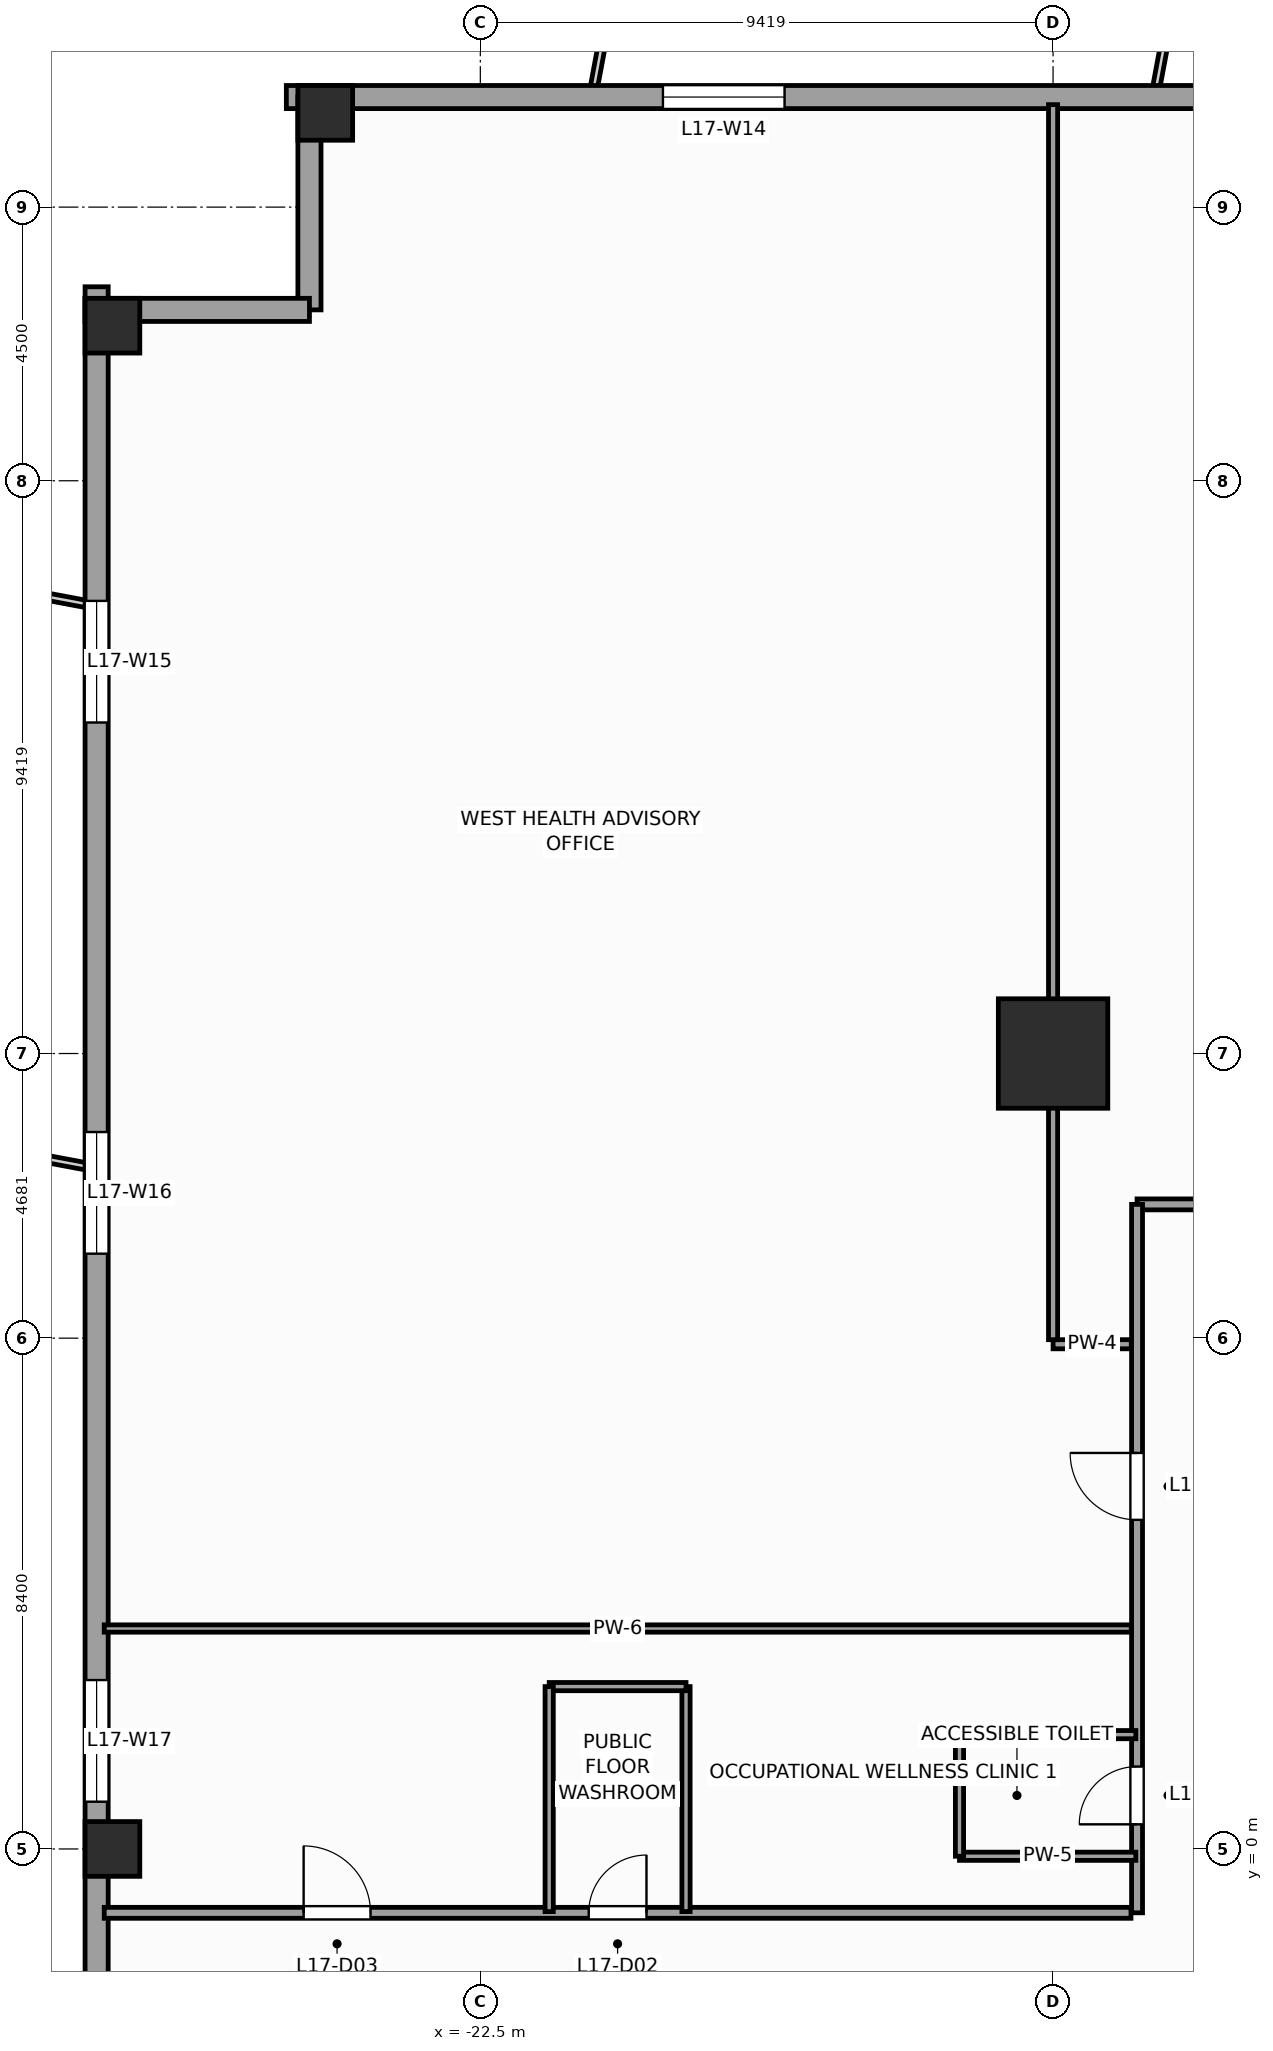
"""IFC4 building model, lengths in metres.
Left out: names, types, materials, properties, quantities, classifications, styles, units other than length and angle.
Written with IfcOpenShell. Run it as: python <this file> out.ifc"""

import sys

from ifc_helpers import new_model, si_unit, direction, frame, frame_2d, origin, origin_2d, place, context, subcontext, project, spatial, rectangle, extrude, source, transform, mapped, element, fill, save


model = new_model("IFC4")
c1 = context("Model", 3, precision=1e-05, world=origin(), true_north=direction((0.0, 1.0)))
c2 = subcontext(c1, "Body", "Model", "MODEL_VIEW")
j1 = project(units=[si_unit("LENGTHUNIT", "METRE"), si_unit("PLANEANGLEUNIT", "RADIAN")], contexts=[c1])
p1 = place(None, origin())
s1 = spatial("IfcSite", under=j1, at=p1, CompositionType="ELEMENT")
p2 = place(p1, origin())
s2 = spatial("IfcBuilding", under=s1, at=p2, CompositionType="ELEMENT")
p3 = place(p2, frame((0.0, 0.0, 74.0)))
s3 = spatial("IfcBuildingStorey", under=s2, at=p3, CompositionType="ELEMENT", Elevation=74.0)
m1 = source(origin(), c2, "Body", "SweptSolid", [
    extrude(rectangle(XDim=1.8, YDim=1.8, at=origin_2d()), origin(), (0.0, 0.0, 1.0), 4.0),
])
p4 = place(p3, frame((-13.081, 13.081, 0.0), z_axis=(0.0, 0.0, 1.0), x_axis=(1.0, 0.0, 0.0)))
e1 = element("IfcColumn", 1, at=p4, inside=s3, PredefinedType="COLUMN", context=c2, shape_type="MappedRepresentation", body=[
    mapped(m1, transform((0.0, 0.0, 0.0), scale=1.0)),
])
m2 = source(origin(), c2, "Body", "SweptSolid", [
    extrude(rectangle(XDim=0.9, YDim=0.9, at=origin_2d()), origin(), (0.0, 0.0, 1.0), 4.0),
])
for number, where, z_axis, x_axis in (
    (2, (-25.05, 28.55, 0.0), (0.0, 0.0, 1.0), (1.0, 0.0, 0.0)),
    (3, (-28.55, 25.05, 0.0), (0.0, 0.0, 1.0), (1.0, 0.0, 0.0)),
    (4, (-28.55, 0.0, 0.0), (0.0, 0.0, 1.0), (1.0, 0.0, 0.0)),
):
    element("IfcColumn", number, at=place(p3, frame(where, z_axis=z_axis, x_axis=x_axis)), inside=s3, PredefinedType="COLUMN", context=c2, shape_type="MappedRepresentation", body=[
        mapped(m2, transform((0.0, 0.0, 0.0), scale=1.0)),
    ])
p5 = place(p3, frame((25.69, 28.81, 0.0), z_axis=(0.0, 0.0, 1.0), x_axis=(-1.0, 0.0, 0.0)))
e5 = element("IfcWall", 5, at=p5, inside=s3, PredefinedType="STANDARD", context=c2, shape_type="SweptSolid", body=[
    extrude(rectangle(XDim=51.38, YDim=0.38, at=frame_2d((25.69, 0.0))), origin(), (0.0, 0.0, 1.0), 2.2),
])
p6 = place(p5, frame((30.765, 0.0, 0.0)))
e6 = element("IfcOpeningElement", 6, at=p6, cuts=e5, PredefinedType="OPENING", context=c2, shape_type="SweptSolid", body=[
    extrude(rectangle(XDim=1.05, YDim=2.02, at=frame_2d((0.525, 1.01))), frame((0.0, 0.2, 0.0), z_axis=(0.0, -1.0, 0.0), x_axis=(1.0, 0.0, 0.0)), (0.0, 0.0, 1.0), 0.4),
])
p7 = place(p5, frame((5.166, 0.0, 0.67)))
e7 = element("IfcOpeningElement", 7, at=p7, cuts=e5, PredefinedType="OPENING", context=c2, shape_type="SweptSolid", body=[
    extrude(rectangle(XDim=2.0, YDim=1.45, at=frame_2d((1.0, 0.725))), frame((0.0, 0.2, 0.0), z_axis=(0.0, -1.0, 0.0), x_axis=(1.0, 0.0, 0.0)), (0.0, 0.0, 1.0), 0.4),
])
p8 = place(p5, frame((13.9, 0.0, 0.67)))
e8 = element("IfcOpeningElement", 8, at=p8, cuts=e5, PredefinedType="OPENING", context=c2, shape_type="SweptSolid", body=[
    extrude(rectangle(XDim=2.0, YDim=1.45, at=frame_2d((1.0, 0.725))), frame((0.0, 0.2, 0.0), z_axis=(0.0, -1.0, 0.0), x_axis=(1.0, 0.0, 0.0)), (0.0, 0.0, 1.0), 0.4),
])
p9 = place(p5, frame((22.912, 0.0, 0.67)))
e9 = element("IfcOpeningElement", 9, at=p9, cuts=e5, PredefinedType="OPENING", context=c2, shape_type="SweptSolid", body=[
    extrude(rectangle(XDim=2.0, YDim=1.45, at=frame_2d((1.0, 0.725))), frame((0.0, 0.2, 0.0), z_axis=(0.0, -1.0, 0.0), x_axis=(1.0, 0.0, 0.0)), (0.0, 0.0, 1.0), 0.4),
])
p10 = place(p5, frame((33.938, 0.0, 0.67)))
e10 = element("IfcOpeningElement", 10, at=p10, cuts=e5, PredefinedType="OPENING", context=c2, shape_type="SweptSolid", body=[
    extrude(rectangle(XDim=2.0, YDim=1.45, at=frame_2d((1.0, 0.725))), frame((0.0, 0.2, 0.0), z_axis=(0.0, -1.0, 0.0), x_axis=(1.0, 0.0, 0.0)), (0.0, 0.0, 1.0), 0.4),
])
p11 = place(p5, frame((43.187, 0.0, 0.67)))
e11 = element("IfcOpeningElement", 11, at=p11, cuts=e5, PredefinedType="OPENING", context=c2, shape_type="SweptSolid", body=[
    extrude(rectangle(XDim=2.0, YDim=1.45, at=frame_2d((1.0, 0.725))), frame((0.0, 0.2, 0.0), z_axis=(0.0, -1.0, 0.0), x_axis=(1.0, 0.0, 0.0)), (0.0, 0.0, 1.0), 0.4),
])
p12 = place(p3, frame((-25.31, 28.81, 0.0), z_axis=(0.0, 0.0, 1.0), x_axis=(0.0, -1.0, 0.0)))
e12 = element("IfcWall", 12, at=p12, inside=s3, PredefinedType="STANDARD", context=c2, shape_type="SweptSolid", body=[
    extrude(rectangle(XDim=3.5, YDim=0.38, at=frame_2d((1.75, 0.0))), origin(), (0.0, 0.0, 1.0), 3.6),
])
p13 = place(p3, frame((-25.31, 25.31, 0.0), z_axis=(0.0, 0.0, 1.0), x_axis=(-1.0, 0.0, 0.0)))
e13 = element("IfcWall", 13, at=p13, inside=s3, PredefinedType="STANDARD", context=c2, shape_type="SweptSolid", body=[
    extrude(rectangle(XDim=3.69, YDim=0.38, at=frame_2d((1.845, 0.0))), origin(), (0.0, 0.0, 1.0), 3.6),
])
p14 = place(p3, frame((-28.81, 25.69, 0.0), z_axis=(0.0, 0.0, 1.0), x_axis=(0.0, -1.0, 0.0)))
e14 = element("IfcWall", 14, at=p14, inside=s3, PredefinedType="STANDARD", context=c2, shape_type="SweptSolid", body=[
    extrude(rectangle(XDim=51.38, YDim=0.38, at=frame_2d((25.69, 0.0))), origin(), (0.0, 0.0, 1.0), 2.2),
])
p15 = place(p14, frame((5.166, 0.0, 0.67)))
e15 = element("IfcOpeningElement", 15, at=p15, cuts=e14, PredefinedType="OPENING", context=c2, shape_type="SweptSolid", body=[
    extrude(rectangle(XDim=2.0, YDim=1.45, at=frame_2d((1.0, 0.725))), frame((0.0, 0.2, 0.0), z_axis=(0.0, -1.0, 0.0), x_axis=(1.0, 0.0, 0.0)), (0.0, 0.0, 1.0), 0.4),
])
p16 = place(p14, frame((13.9, 0.0, 0.67)))
e16 = element("IfcOpeningElement", 16, at=p16, cuts=e14, PredefinedType="OPENING", context=c2, shape_type="SweptSolid", body=[
    extrude(rectangle(XDim=2.0, YDim=1.45, at=frame_2d((1.0, 0.725))), frame((0.0, 0.2, 0.0), z_axis=(0.0, -1.0, 0.0), x_axis=(1.0, 0.0, 0.0)), (0.0, 0.0, 1.0), 0.4),
])
p17 = place(p14, frame((22.912, 0.0, 0.67)))
e17 = element("IfcOpeningElement", 17, at=p17, cuts=e14, PredefinedType="OPENING", context=c2, shape_type="SweptSolid", body=[
    extrude(rectangle(XDim=2.0, YDim=1.45, at=frame_2d((1.0, 0.725))), frame((0.0, 0.2, 0.0), z_axis=(0.0, -1.0, 0.0), x_axis=(1.0, 0.0, 0.0)), (0.0, 0.0, 1.0), 0.4),
])
p18 = place(p14, frame((33.938, 0.0, 0.67)))
e18 = element("IfcOpeningElement", 18, at=p18, cuts=e14, PredefinedType="OPENING", context=c2, shape_type="SweptSolid", body=[
    extrude(rectangle(XDim=2.0, YDim=1.45, at=frame_2d((1.0, 0.725))), frame((0.0, 0.2, 0.0), z_axis=(0.0, -1.0, 0.0), x_axis=(1.0, 0.0, 0.0)), (0.0, 0.0, 1.0), 0.4),
])
p19 = place(p14, frame((43.187, 0.0, 0.67)))
e19 = element("IfcOpeningElement", 19, at=p19, cuts=e14, PredefinedType="OPENING", context=c2, shape_type="SweptSolid", body=[
    extrude(rectangle(XDim=2.0, YDim=1.45, at=frame_2d((1.0, 0.725))), frame((0.0, 0.2, 0.0), z_axis=(0.0, -1.0, 0.0), x_axis=(1.0, 0.0, 0.0)), (0.0, 0.0, 1.0), 0.4),
])
p20 = place(p3, frame((-11.7, 10.6, 0.0), z_axis=(0.0, 0.0, 1.0), x_axis=(1.0, 0.0, 0.0)))
e20 = element("IfcWall", 20, at=p20, inside=s3, PredefinedType="PARTITIONING", context=c2, shape_type="SweptSolid", body=[
    extrude(rectangle(XDim=24.45, YDim=0.18, at=frame_2d((12.225, 0.0))), origin(), (0.0, 0.0, 1.0), 3.6),
])
p21 = place(p20, frame((3.714, 0.0, 0.0)))
e21 = element("IfcOpeningElement", 21, at=p21, cuts=e20, PredefinedType="OPENING", context=c2, shape_type="SweptSolid", body=[
    extrude(rectangle(XDim=1.1, YDim=2.2, at=frame_2d((0.55, 1.1))), frame((0.0, 0.1, 0.0), z_axis=(0.0, -1.0, 0.0), x_axis=(1.0, 0.0, 0.0)), (0.0, 0.0, 1.0), 0.2),
])
p22 = place(p20, frame((11.65, 0.0, 0.0)))
e22 = element("IfcOpeningElement", 22, at=p22, cuts=e20, PredefinedType="OPENING", context=c2, shape_type="SweptSolid", body=[
    extrude(rectangle(XDim=1.1, YDim=2.2, at=frame_2d((0.55, 1.1))), frame((0.0, 0.1, 0.0), z_axis=(0.0, -1.0, 0.0), x_axis=(1.0, 0.0, 0.0)), (0.0, 0.0, 1.0), 0.2),
])
p23 = place(p20, frame((19.611, 0.0, 0.0)))
e23 = element("IfcOpeningElement", 23, at=p23, cuts=e20, PredefinedType="OPENING", context=c2, shape_type="SweptSolid", body=[
    extrude(rectangle(XDim=1.1, YDim=2.2, at=frame_2d((0.55, 1.1))), frame((0.0, 0.1, 0.0), z_axis=(0.0, -1.0, 0.0), x_axis=(1.0, 0.0, 0.0)), (0.0, 0.0, 1.0), 0.2),
])
p24 = place(p3, frame((-11.7, -1.05, 0.0), z_axis=(0.0, 0.0, 1.0), x_axis=(0.0, 1.0, 0.0)))
e24 = element("IfcWall", 24, at=p24, inside=s3, PredefinedType="PARTITIONING", context=c2, shape_type="SweptSolid", body=[
    extrude(rectangle(XDim=11.65, YDim=0.18, at=frame_2d((5.825, 0.0))), origin(), (0.0, 0.0, 1.0), 3.6),
])
p25 = place(p24, frame((1.455, 0.0, 0.0)))
e25 = element("IfcOpeningElement", 25, at=p25, cuts=e24, PredefinedType="OPENING", context=c2, shape_type="SweptSolid", body=[
    extrude(rectangle(XDim=0.95, YDim=2.1, at=frame_2d((0.475, 1.05))), frame((0.0, 0.1, 0.0), z_axis=(0.0, -1.0, 0.0), x_axis=(1.0, 0.0, 0.0)), (0.0, 0.0, 1.0), 0.2),
])
p26 = place(p24, frame((6.462, 0.0, 0.0)))
e26 = element("IfcOpeningElement", 26, at=p26, cuts=e24, PredefinedType="OPENING", context=c2, shape_type="SweptSolid", body=[
    extrude(rectangle(XDim=1.1, YDim=2.2, at=frame_2d((0.55, 1.1))), frame((0.0, 0.1, 0.0), z_axis=(0.0, -1.0, 0.0), x_axis=(1.0, 0.0, 0.0)), (0.0, 0.0, 1.0), 0.2),
])
p27 = place(p3, frame((-28.685, -1.05, 0.0), z_axis=(0.0, 0.0, 1.0), x_axis=(1.0, 0.0, 0.0)))
e27 = element("IfcWall", 27, at=p27, inside=s3, PredefinedType="PARTITIONING", context=c2, shape_type="SweptSolid", body=[
    extrude(rectangle(XDim=16.885, YDim=0.18, at=frame_2d((8.442, 0.0))), origin(), (0.0, 0.0, 1.0), 3.6),
])
p28 = place(p27, frame((7.968, 0.0, 0.0)))
e28 = element("IfcOpeningElement", 28, at=p28, cuts=e27, PredefinedType="OPENING", context=c2, shape_type="SweptSolid", body=[
    extrude(rectangle(XDim=0.95, YDim=2.1, at=frame_2d((0.475, 1.05))), frame((0.0, 0.1, 0.0), z_axis=(0.0, -1.0, 0.0), x_axis=(1.0, 0.0, 0.0)), (0.0, 0.0, 1.0), 0.2),
])
p29 = place(p27, frame((3.279, 0.0, 0.0)))
e29 = element("IfcOpeningElement", 29, at=p29, cuts=e27, PredefinedType="OPENING", context=c2, shape_type="SweptSolid", body=[
    extrude(rectangle(XDim=1.1, YDim=2.2, at=frame_2d((0.55, 1.1))), frame((0.0, 0.1, 0.0), z_axis=(0.0, -1.0, 0.0), x_axis=(1.0, 0.0, 0.0)), (0.0, 0.0, 1.0), 0.2),
])
p30 = place(p3, frame((-11.795, 8.3, 0.0), z_axis=(0.0, 0.0, 1.0), x_axis=(-1.0, 0.0, 0.0)))
e30 = element("IfcWall", 30, at=p30, inside=s3, PredefinedType="PARTITIONING", context=c2, shape_type="SweptSolid", body=[
    extrude(rectangle(XDim=1.286, YDim=0.15, at=frame_2d((0.643, 0.0))), origin(), (0.0, 0.0, 1.0), 3.6),
])
p31 = place(p3, frame((-13.081, 8.375, 0.0), z_axis=(0.0, 0.0, 1.0), x_axis=(0.0, 1.0, 0.0)))
e31 = element("IfcWall", 31, at=p31, inside=s3, PredefinedType="PARTITIONING", context=c2, shape_type="SweptSolid", body=[
    extrude(rectangle(XDim=20.31, YDim=0.15, at=frame_2d((10.155, 0.0))), origin(), (0.0, 0.0, 1.0), 2.2),
])
p32 = place(p3, frame((-28.685, 3.625, 0.0), z_axis=(0.0, 0.0, 1.0), x_axis=(1.0, 0.0, 0.0)))
e32 = element("IfcWall", 32, at=p32, inside=s3, PredefinedType="PARTITIONING", context=c2, shape_type="SweptSolid", body=[
    extrude(rectangle(XDim=16.89, YDim=0.12, at=frame_2d((8.445, 0.0))), origin(), (0.0, 0.0, 1.0), 3.6),
])
for number, where, z_axis, x_axis in (
    (33, (-14.62, -0.12, 0.0), (0.0, 0.0, 1.0), (1.0, 0.0, 0.0)),
    (34, (-14.62, 1.88, 0.0), (0.0, 0.0, 1.0), (1.0, 0.0, 0.0)),
):
    element("IfcWall", number, at=place(p3, frame(where, z_axis=z_axis, x_axis=x_axis)), inside=s3, PredefinedType="PARTITIONING", context=c2, shape_type="SweptSolid", body=[
        extrude(rectangle(XDim=2.9, YDim=0.135, at=frame_2d((1.45, 0.0))), origin(), (0.0, 0.0, 1.0), 3.6),
    ])
p33 = place(p3, frame((-14.62, -0.12, 0.0), z_axis=(0.0, 0.0, 1.0), x_axis=(0.0, 1.0, 0.0)))
e35 = element("IfcWall", 35, at=p33, inside=s3, PredefinedType="PARTITIONING", context=c2, shape_type="SweptSolid", body=[
    extrude(rectangle(XDim=2.0, YDim=0.135, at=frame_2d((1.0, 0.0))), origin(), (0.0, 0.0, 1.0), 3.6),
])
p34 = place(p3, frame((-19.117, -1.03, 0.0), z_axis=(0.0, 0.0, 1.0), x_axis=(0.0, 1.0, 0.0)))
e36 = element("IfcWall", 36, at=p34, inside=s3, PredefinedType="PARTITIONING", context=c2, shape_type="SweptSolid", body=[
    extrude(rectangle(XDim=3.7, YDim=0.135, at=frame_2d((1.85, 0.0))), origin(), (0.0, 0.0, 1.0), 3.6),
])
p35 = place(p3, frame((-21.367, 2.67, 0.0), z_axis=(0.0, 0.0, 1.0), x_axis=(1.0, 0.0, 0.0)))
e37 = element("IfcWall", 37, at=p35, inside=s3, PredefinedType="PARTITIONING", context=c2, shape_type="SweptSolid", body=[
    extrude(rectangle(XDim=2.25, YDim=0.135, at=frame_2d((1.125, 0.0))), origin(), (0.0, 0.0, 1.0), 3.6),
])
p36 = place(p3, frame((-21.367, -1.03, 0.0), z_axis=(0.0, 0.0, 1.0), x_axis=(0.0, 1.0, 0.0)))
e38 = element("IfcWall", 38, at=p36, inside=s3, PredefinedType="PARTITIONING", context=c2, shape_type="SweptSolid", body=[
    extrude(rectangle(XDim=3.7, YDim=0.135, at=frame_2d((1.85, 0.0))), origin(), (0.0, 0.0, 1.0), 3.6),
])
m3 = source(origin(), c2, "Body", "SweptSolid", [
    extrude(rectangle(XDim=2.0, YDim=1.45, at=frame_2d((1.0, 0.725))), frame((0.0, 0.03, 0.0), z_axis=(0.0, -1.0, 0.0), x_axis=(1.0, 0.0, 0.0)), (0.0, 0.0, 1.0), 0.06),
])
p37 = place(p11, origin())
e39 = element("IfcWindow", 39, at=p37, inside=s3, PartitioningType="SINGLE_PANEL", PredefinedType="WINDOW", context=c2, shape_type="MappedRepresentation", body=[
    mapped(m3, transform((0.0, 0.0, 0.0), scale=1.0)),
])
fill(e11, e39)
p38 = place(p15, origin())
e40 = element("IfcWindow", 40, at=p38, inside=s3, PartitioningType="SINGLE_PANEL", PredefinedType="WINDOW", context=c2, shape_type="MappedRepresentation", body=[
    mapped(m3, transform((0.0, 0.0, 0.0), scale=1.0)),
])
fill(e15, e40)
p39 = place(p16, origin())
e41 = element("IfcWindow", 41, at=p39, inside=s3, PartitioningType="SINGLE_PANEL", PredefinedType="WINDOW", context=c2, shape_type="MappedRepresentation", body=[
    mapped(m3, transform((0.0, 0.0, 0.0), scale=1.0)),
])
fill(e16, e41)
p40 = place(p17, origin())
e42 = element("IfcWindow", 42, at=p40, inside=s3, PartitioningType="SINGLE_PANEL", PredefinedType="WINDOW", context=c2, shape_type="MappedRepresentation", body=[
    mapped(m3, transform((0.0, 0.0, 0.0), scale=1.0)),
])
fill(e17, e42)
m4 = source(origin(), c2, "Body", "SweptSolid", [
    extrude(rectangle(XDim=0.95, YDim=2.1, at=frame_2d((0.475, 1.05))), frame((0.0, 0.025, 0.0), z_axis=(0.0, -1.0, 0.0), x_axis=(1.0, 0.0, 0.0)), (0.0, 0.0, 1.0), 0.05),
])
p41 = place(p25, origin())
e43 = element("IfcDoor", 43, at=p41, inside=s3, OperationType="SINGLE_SWING_LEFT", PredefinedType="DOOR", context=c2, shape_type="MappedRepresentation", body=[
    mapped(m4, transform((0.0, 0.0, 0.0), scale=1.0)),
])
fill(e25, e43)
p42 = place(p28, origin())
e44 = element("IfcDoor", 44, at=p42, inside=s3, OperationType="SINGLE_SWING_RIGHT", PredefinedType="DOOR", context=c2, shape_type="MappedRepresentation", body=[
    mapped(m4, transform((0.0, 0.0, 0.0), scale=1.0)),
])
fill(e28, e44)
m5 = source(origin(), c2, "Body", "SweptSolid", [
    extrude(rectangle(XDim=1.1, YDim=2.2, at=frame_2d((0.55, 1.1))), frame((0.0, 0.025, 0.0), z_axis=(0.0, -1.0, 0.0), x_axis=(1.0, 0.0, 0.0)), (0.0, 0.0, 1.0), 0.05),
])
p43 = place(p29, origin())
e45 = element("IfcDoor", 45, at=p43, inside=s3, OperationType="SINGLE_SWING_LEFT", PredefinedType="DOOR", context=c2, shape_type="MappedRepresentation", body=[
    mapped(m5, transform((0.0, 0.0, 0.0), scale=1.0)),
])
fill(e29, e45)
p44 = place(p26, origin())
e46 = element("IfcDoor", 46, at=p44, inside=s3, OperationType="SINGLE_SWING_RIGHT", PredefinedType="DOOR", context=c2, shape_type="MappedRepresentation", body=[
    mapped(m5, transform((0.0, 0.0, 0.0), scale=1.0)),
])
fill(e26, e46)
save(model, sys.argv[1])
